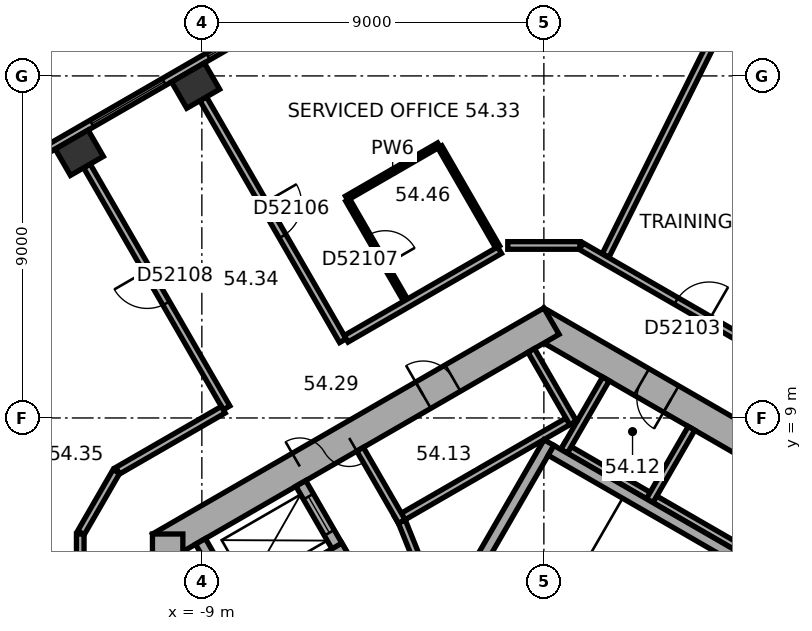
"""IFC4 building model, lengths in metres.
Left out: names, types, materials, properties, quantities, classifications, styles, units other than length and angle.
Written with IfcOpenShell. Run it as: python <this file> out.ifc"""

import sys

from ifc_helpers import new_model, si_unit, direction, frame, frame_2d, origin, origin_2d, place, context, subcontext, project, spatial, rectangle, extrude, element, fill, save


model = new_model("IFC4")
c1 = context("Model", 3, precision=1e-05, world=origin(), true_north=direction((0.0, 1.0)))
c2 = subcontext(c1, "Body", "Model", "MODEL_VIEW")
j1 = project(units=[si_unit("LENGTHUNIT", "METRE"), si_unit("PLANEANGLEUNIT", "RADIAN")], contexts=[c1])
p1 = place(None, origin())
s1 = spatial("IfcSite", under=j1, at=p1, CompositionType="ELEMENT")
p2 = place(p1, origin())
s2 = spatial("IfcBuilding", under=s1, at=p2, CompositionType="ELEMENT")
p3 = place(p2, frame((0.0, 0.0, 221.7)))
s3 = spatial("IfcBuildingStorey", under=s2, at=p3, CompositionType="ELEMENT", Elevation=221.7)
for number, where, z_axis, x_axis in (
    (1, (-9.165, 17.745, 0.0), (0.0, 0.0, 1.0), (-0.866, -0.5, 0.0)),
    (2, (-12.225, 15.978, 0.0), (0.0, 0.0, 1.0), (-0.866, -0.5, 0.0)),
):
    element("IfcColumn", number, at=place(p3, frame(where, z_axis=z_axis, x_axis=x_axis)), inside=s3, PredefinedType="COLUMN", context=c2, shape_type="SweptSolid", body=[
        extrude(rectangle(XDim=1.0, YDim=0.8, at=origin_2d()), origin(), (0.0, 0.0, 1.0), 3.7),
    ])
p4 = place(p3, frame((10.1, 5.6, 0.0), z_axis=(0.0, 0.0, 1.0), x_axis=(-0.866023897231, 0.500002609418, 0.0)))
e3 = element("IfcWall", 3, at=p4, inside=s3, PredefinedType="SHEAR", context=c2, shape_type="SweptSolid", body=[
    extrude(rectangle(XDim=11.894, YDim=0.8, at=frame_2d((5.947, 0.0))), origin(), (0.0, 0.0, 1.0), 3.7),
])
p5 = place(p4, frame((3.897, 0.0, 0.0)))
e4 = element("IfcOpeningElement", 4, at=p5, cuts=e3, PredefinedType="OPENING", context=c2, shape_type="SweptSolid", body=[
    extrude(rectangle(XDim=0.9, YDim=2.1, at=frame_2d((0.45, 1.05))), frame((0.0, 0.41, 0.0), z_axis=(0.0, -1.0, 0.0), x_axis=(1.0, 0.0, 0.0)), (0.0, 0.0, 1.0), 0.82),
])
p6 = place(p4, frame((7.797, 0.0, 0.0)))
e5 = element("IfcOpeningElement", 5, at=p6, cuts=e3, PredefinedType="OPENING", context=c2, shape_type="SweptSolid", body=[
    extrude(rectangle(XDim=0.9, YDim=2.1, at=frame_2d((0.45, 1.05))), frame((0.0, 0.41, 0.0), z_axis=(0.0, -1.0, 0.0), x_axis=(1.0, 0.0, 0.0)), (0.0, 0.0, 1.0), 0.82),
])
p7 = place(p3, frame((0.2, 11.547, 0.0), z_axis=(0.0, 0.0, 1.0), x_axis=(-0.866023897231, -0.500002609418, 0.0)))
e6 = element("IfcWall", 6, at=p7, inside=s3, PredefinedType="SHEAR", context=c2, shape_type="SweptSolid", body=[
    extrude(rectangle(XDim=11.894, YDim=0.8, at=frame_2d((5.947, 0.0))), origin(), (0.0, 0.0, 1.0), 3.7),
])
p8 = place(p7, frame((6.147, 0.0, 0.0)))
e7 = element("IfcOpeningElement", 7, at=p8, cuts=e6, PredefinedType="OPENING", context=c2, shape_type="SweptSolid", body=[
    extrude(rectangle(XDim=1.5, YDim=2.1, at=frame_2d((0.75, 1.05))), frame((0.0, 0.41, 0.0), z_axis=(0.0, -1.0, 0.0), x_axis=(1.0, 0.0, 0.0)), (0.0, 0.0, 1.0), 0.82),
])
p9 = place(p7, frame((2.997, 0.0, 0.0)))
e8 = element("IfcOpeningElement", 8, at=p9, cuts=e6, PredefinedType="OPENING", context=c2, shape_type="SweptSolid", body=[
    extrude(rectangle(XDim=0.9, YDim=2.1, at=frame_2d((0.45, 1.05))), frame((0.0, 0.41, 0.0), z_axis=(0.0, -1.0, 0.0), x_axis=(1.0, 0.0, 0.0)), (0.0, 0.0, 1.0), 0.82),
])
p10 = place(p3, frame((-9.9, 5.947, 0.0), z_axis=(0.0, 0.0, 1.0), x_axis=(0.0, -1.0, 0.0)))
e9 = element("IfcWall", 9, at=p10, inside=s3, PredefinedType="SHEAR", context=c2, shape_type="SweptSolid", body=[
    extrude(rectangle(XDim=11.894, YDim=0.8, at=frame_2d((5.947, 0.0))), origin(), (0.0, 0.0, 1.0), 3.7),
])
p11 = place(p10, frame((5.097, 0.0, 0.0)))
e10 = element("IfcOpeningElement", 10, at=p11, cuts=e9, PredefinedType="OPENING", context=c2, shape_type="SweptSolid", body=[
    extrude(rectangle(XDim=1.1, YDim=2.1, at=frame_2d((0.55, 1.05))), frame((0.0, 0.41, 0.0), z_axis=(0.0, -1.0, 0.0), x_axis=(1.0, 0.0, 0.0)), (0.0, 0.0, 1.0), 0.82),
])
p12 = place(p10, frame((7.697, 0.0, 0.0)))
e11 = element("IfcOpeningElement", 11, at=p12, cuts=e9, PredefinedType="OPENING", context=c2, shape_type="SweptSolid", body=[
    extrude(rectangle(XDim=1.1, YDim=2.1, at=frame_2d((0.55, 1.05))), frame((0.0, 0.41, 0.0), z_axis=(0.0, -1.0, 0.0), x_axis=(1.0, 0.0, 0.0)), (0.0, 0.0, 1.0), 0.82),
])
p13 = place(p3, frame((18.299, 13.727, 0.0), z_axis=(0.0, 0.0, 1.0), x_axis=(-0.894934554817, 0.44619742558, 0.0)))
e12 = element("IfcWall", 12, at=p13, inside=s3, PredefinedType="STANDARD", context=c2, shape_type="SweptSolid", body=[
    extrude(rectangle(XDim=18.841, YDim=0.2, at=frame_2d((9.421, 0.0))), origin(), (0.0, 0.0, 1.0), 3.7),
])
p14 = place(p13, frame((1.253, 0.0, 0.9)))
e13 = element("IfcOpeningElement", 13, at=p14, cuts=e12, PredefinedType="OPENING", context=c2, shape_type="SweptSolid", body=[
    extrude(rectangle(XDim=2.2, YDim=2.0, at=frame_2d((1.1, 1.0))), frame((0.0, 0.11, 0.0), z_axis=(0.0, -1.0, 0.0), x_axis=(1.0, 0.0, 0.0)), (0.0, 0.0, 1.0), 0.22),
])
p15 = place(p13, frame((4.786, 0.0, 0.9)))
e14 = element("IfcOpeningElement", 14, at=p15, cuts=e12, PredefinedType="OPENING", context=c2, shape_type="SweptSolid", body=[
    extrude(rectangle(XDim=2.2, YDim=2.0, at=frame_2d((1.1, 1.0))), frame((0.0, 0.11, 0.0), z_axis=(0.0, -1.0, 0.0), x_axis=(1.0, 0.0, 0.0)), (0.0, 0.0, 1.0), 0.22),
])
p16 = place(p13, frame((8.32, 0.0, 0.9)))
e15 = element("IfcOpeningElement", 15, at=p16, cuts=e12, PredefinedType="OPENING", context=c2, shape_type="SweptSolid", body=[
    extrude(rectangle(XDim=2.2, YDim=2.0, at=frame_2d((1.1, 1.0))), frame((0.0, 0.11, 0.0), z_axis=(0.0, -1.0, 0.0), x_axis=(1.0, 0.0, 0.0)), (0.0, 0.0, 1.0), 0.22),
])
p17 = place(p13, frame((11.854, 0.0, 0.9)))
e16 = element("IfcOpeningElement", 16, at=p17, cuts=e12, PredefinedType="OPENING", context=c2, shape_type="SweptSolid", body=[
    extrude(rectangle(XDim=2.2, YDim=2.0, at=frame_2d((1.1, 1.0))), frame((0.0, 0.11, 0.0), z_axis=(0.0, -1.0, 0.0), x_axis=(1.0, 0.0, 0.0)), (0.0, 0.0, 1.0), 0.22),
])
p18 = place(p13, frame((15.387, 0.0, 0.9)))
e17 = element("IfcOpeningElement", 17, at=p18, cuts=e12, PredefinedType="OPENING", context=c2, shape_type="SweptSolid", body=[
    extrude(rectangle(XDim=2.2, YDim=2.0, at=frame_2d((1.1, 1.0))), frame((0.0, 0.11, 0.0), z_axis=(0.0, -1.0, 0.0), x_axis=(1.0, 0.0, 0.0)), (0.0, 0.0, 1.0), 0.22),
])
p19 = place(p3, frame((-2.786, 22.005, 0.0), z_axis=(0.0, 0.0, 1.0), x_axis=(-0.866026555358, -0.49999800541, 0.0)))
e18 = element("IfcWall", 18, at=p19, inside=s3, PredefinedType="STANDARD", context=c2, shape_type="SweptSolid", body=[
    extrude(rectangle(XDim=18.841, YDim=0.2, at=frame_2d((9.421, 0.0))), origin(), (0.0, 0.0, 1.0), 3.7),
])
p20 = place(p19, frame((1.254, 0.0, 0.9)))
e19 = element("IfcOpeningElement", 19, at=p20, cuts=e18, PredefinedType="OPENING", context=c2, shape_type="SweptSolid", body=[
    extrude(rectangle(XDim=2.2, YDim=2.0, at=frame_2d((1.1, 1.0))), frame((0.0, 0.11, 0.0), z_axis=(0.0, -1.0, 0.0), x_axis=(1.0, 0.0, 0.0)), (0.0, 0.0, 1.0), 0.22),
])
p21 = place(p19, frame((4.788, 0.0, 0.9)))
e20 = element("IfcOpeningElement", 20, at=p21, cuts=e18, PredefinedType="OPENING", context=c2, shape_type="SweptSolid", body=[
    extrude(rectangle(XDim=2.2, YDim=2.0, at=frame_2d((1.1, 1.0))), frame((0.0, 0.11, 0.0), z_axis=(0.0, -1.0, 0.0), x_axis=(1.0, 0.0, 0.0)), (0.0, 0.0, 1.0), 0.22),
])
p22 = place(p19, frame((8.321, 0.0, 0.9)))
e21 = element("IfcOpeningElement", 21, at=p22, cuts=e18, PredefinedType="OPENING", context=c2, shape_type="SweptSolid", body=[
    extrude(rectangle(XDim=2.2, YDim=2.0, at=frame_2d((1.1, 1.0))), frame((0.0, 0.11, 0.0), z_axis=(0.0, -1.0, 0.0), x_axis=(1.0, 0.0, 0.0)), (0.0, 0.0, 1.0), 0.22),
])
p23 = place(p19, frame((11.855, 0.0, 0.9)))
e22 = element("IfcOpeningElement", 22, at=p23, cuts=e18, PredefinedType="OPENING", context=c2, shape_type="SweptSolid", body=[
    extrude(rectangle(XDim=2.2, YDim=2.0, at=frame_2d((1.1, 1.0))), frame((0.0, 0.11, 0.0), z_axis=(0.0, -1.0, 0.0), x_axis=(1.0, 0.0, 0.0)), (0.0, 0.0, 1.0), 0.22),
])
p24 = place(p19, frame((15.389, 0.0, 0.9)))
e23 = element("IfcOpeningElement", 23, at=p24, cuts=e18, PredefinedType="OPENING", context=c2, shape_type="SweptSolid", body=[
    extrude(rectangle(XDim=2.2, YDim=2.0, at=frame_2d((1.1, 1.0))), frame((0.0, 0.11, 0.0), z_axis=(0.0, -1.0, 0.0), x_axis=(1.0, 0.0, 0.0)), (0.0, 0.0, 1.0), 0.22),
])
p25 = place(p3, frame((7.424, 4.259, 0.0), z_axis=(0.0, 0.0, 1.0), x_axis=(-0.866026010844, 0.49999894854, 0.0)))
e24 = element("IfcWall", 24, at=p25, inside=s3, PredefinedType="PARTITIONING", context=c2, shape_type="SweptSolid", body=[
    extrude(rectangle(XDim=8.0, YDim=0.2, at=frame_2d((4.0, 0.0))), origin(), (0.0, 0.0, 1.0), 3.42),
])
for number, where, z_axis, x_axis in (
    (25, (2.784, 6.822, 0.0), (0.0, 0.0, 1.0), (0.5, 0.866, 0.0)),
    (26, (0.532, 8.122, 0.0), (0.0, 0.0, 1.0), (0.5, 0.866, 0.0)),
):
    element("IfcWall", number, at=place(p3, frame(where, z_axis=z_axis, x_axis=x_axis)), inside=s3, PredefinedType="PARTITIONING", context=c2, shape_type="SweptSolid", body=[
        extrude(rectangle(XDim=2.2, YDim=0.2, at=frame_2d((1.1, 0.0))), origin(), (0.0, 0.0, 1.0), 3.42),
    ])
p26 = place(p3, frame((0.803, 9.009, 0.0), z_axis=(0.0, 0.0, 1.0), x_axis=(-0.866028230842, -0.499995103361, 0.0)))
e27 = element("IfcWall", 27, at=p26, inside=s3, PredefinedType="PARTITIONING", context=c2, shape_type="SweptSolid", body=[
    extrude(rectangle(XDim=5.4, YDim=0.2, at=frame_2d((2.7, 0.0))), origin(), (0.0, 0.0, 1.0), 3.42),
])
p27 = place(p3, frame((0.767, 8.872, 0.0), z_axis=(0.0, 0.0, 1.0), x_axis=(-0.499994660107, 0.866028486751, 0.0)))
e28 = element("IfcWall", 28, at=p27, inside=s3, PredefinedType="PARTITIONING", context=c2, shape_type="SweptSolid", body=[
    extrude(rectangle(XDim=2.2, YDim=0.2, at=frame_2d((1.1, 0.0))), origin(), (0.0, 0.0, 1.0), 3.42),
])
p28 = place(p3, frame((-3.737, 6.272, 0.0), z_axis=(0.0, 0.0, 1.0), x_axis=(-0.50002983664, 0.866008176907, 0.0)))
e29 = element("IfcWall", 29, at=p28, inside=s3, PredefinedType="PARTITIONING", context=c2, shape_type="SweptSolid", body=[
    extrude(rectangle(XDim=2.2, YDim=0.2, at=frame_2d((1.1, 0.0))), origin(), (0.0, 0.0, 1.0), 3.42),
])
p29 = place(p3, frame((-2.216, 4.282, 0.0), z_axis=(0.0, 0.0, 1.0), x_axis=(0.499977259774, 0.866038532462, 0.0)))
e30 = element("IfcWall", 30, at=p29, inside=s3, PredefinedType="SHEAR", context=c2, shape_type="SweptSolid", body=[
    extrude(rectangle(XDim=4.7, YDim=0.3, at=frame_2d((2.35, 0.0))), origin(), (0.0, 0.0, 1.0), 3.42),
])
p30 = place(p3, frame((6.303, 4.617, 0.0), z_axis=(0.0, 0.0, 1.0), x_axis=(-0.866027801685, 0.499995846692, 0.0)))
e31 = element("IfcWall", 31, at=p30, inside=s3, PredefinedType="SHEAR", context=c2, shape_type="SweptSolid", body=[
    extrude(rectangle(XDim=7.06, YDim=0.3, at=frame_2d((3.53, 0.0))), origin(), (0.0, 0.0, 1.0), 3.42),
])
p31 = place(p3, frame((-5.295, 5.372, 0.0), z_axis=(0.0, 0.0, 1.0), x_axis=(-0.500077893725, 0.86598042715, 0.0)))
e32 = element("IfcWall", 32, at=p31, inside=s3, PredefinedType="SHEAR", context=c2, shape_type="SweptSolid", body=[
    extrude(rectangle(XDim=2.2, YDim=0.3, at=frame_2d((1.1, 0.0))), origin(), (0.0, 0.0, 1.0), 3.42),
])
p32 = place(p31, frame((0.7, 0.0, 0.0)))
e33 = element("IfcOpeningElement", 33, at=p32, cuts=e32, PredefinedType="OPENING", context=c2, shape_type="SweptSolid", body=[
    extrude(rectangle(XDim=1.1, YDim=2.1, at=frame_2d((0.55, 1.05))), frame((0.0, 0.16, 0.0), z_axis=(0.0, -1.0, 0.0), x_axis=(1.0, 0.0, 0.0)), (0.0, 0.0, 1.0), 0.32),
])
p33 = place(p3, frame((-5.24, 5.577, 0.0), z_axis=(0.0, 0.0, 1.0), x_axis=(-0.866014461049, -0.500018952895, 0.0)))
e34 = element("IfcWall", 34, at=p33, inside=s3, PredefinedType="SHEAR", context=c2, shape_type="SweptSolid", body=[
    extrude(rectangle(XDim=3.35, YDim=0.3, at=frame_2d((1.675, 0.0))), origin(), (0.0, 0.0, 1.0), 3.42),
])
p34 = place(p3, frame((-7.937, 3.847, 0.0), z_axis=(0.0, 0.0, 1.0), x_axis=(-0.50002983664, 0.866008176907, 0.0)))
e35 = element("IfcWall", 35, at=p34, inside=s3, PredefinedType="SHEAR", context=c2, shape_type="SweptSolid", body=[
    extrude(rectangle(XDim=2.2, YDim=0.3, at=frame_2d((1.1, 0.0))), origin(), (0.0, 0.0, 1.0), 3.42),
])
p35 = place(p3, frame((-2.615, 3.487, 0.0), z_axis=(0.0, 0.0, 1.0), x_axis=(-0.373576831041, 0.92759924068, 0.0)))
e36 = element("IfcWall", 36, at=p35, inside=s3, PredefinedType="PARTITIONING", context=c2, shape_type="SweptSolid", body=[
    extrude(rectangle(XDim=3.002, YDim=0.2, at=frame_2d((1.501, 0.0))), origin(), (0.0, 0.0, 1.0), 3.42),
])
p36 = place(p35, frame((1.15, 0.0, 0.0)))
e37 = element("IfcOpeningElement", 37, at=p36, cuts=e36, PredefinedType="OPENING", context=c2, shape_type="SweptSolid", body=[
    extrude(rectangle(XDim=0.9, YDim=2.1, at=frame_2d((0.45, 1.05))), frame((0.0, 0.11, 0.0), z_axis=(0.0, -1.0, 0.0), x_axis=(1.0, 0.0, 0.0)), (0.0, 0.0, 1.0), 0.22),
])
p37 = place(p3, frame((-12.2, 5.947, 0.0), z_axis=(0.0, 0.0, 1.0), x_axis=(0.0, -1.0, 0.0)))
e38 = element("IfcWall", 38, at=p37, inside=s3, PredefinedType="PARTITIONING", context=c2, shape_type="SweptSolid", body=[
    extrude(rectangle(XDim=3.746, YDim=0.2, at=frame_2d((1.873, 0.0))), origin(), (0.0, 0.0, 1.0), 3.42),
])
p38 = place(p3, frame((-12.025, 15.632, 0.0), z_axis=(0.0, 0.0, 1.0), x_axis=(0.499983153418, -0.866035129944, 0.0)))
e39 = element("IfcWall", 39, at=p38, inside=s3, PredefinedType="PARTITIONING", context=c2, shape_type="SweptSolid", body=[
    extrude(rectangle(XDim=7.35, YDim=0.2, at=frame_2d((3.675, 0.0))), origin(), (0.0, 0.0, 1.0), 3.42),
])
p39 = place(p38, frame((3.175, 0.0, 0.0)))
e40 = element("IfcOpeningElement", 40, at=p39, cuts=e39, PredefinedType="OPENING", context=c2, shape_type="SweptSolid", body=[
    extrude(rectangle(XDim=1.0, YDim=2.1, at=frame_2d((0.5, 1.05))), frame((0.0, 0.11, 0.0), z_axis=(0.0, -1.0, 0.0), x_axis=(1.0, 0.0, 0.0)), (0.0, 0.0, 1.0), 0.22),
])
p40 = place(p3, frame((-11.25, 7.592, 0.0), z_axis=(0.0, 0.0, 1.0), x_axis=(-0.499964847546, -0.866045698112, 0.0)))
e41 = element("IfcWall", 41, at=p40, inside=s3, PredefinedType="PARTITIONING", context=c2, shape_type="SweptSolid", body=[
    extrude(rectangle(XDim=1.86, YDim=0.2, at=frame_2d((0.93, 0.0))), origin(), (0.0, 0.0, 1.0), 3.42),
])
p41 = place(p3, frame((-8.965, 17.399, 0.0), z_axis=(0.0, 0.0, 1.0), x_axis=(0.499993683172, -0.866029050776, 0.0)))
e42 = element("IfcWall", 42, at=p41, inside=s3, PredefinedType="PARTITIONING", context=c2, shape_type="SweptSolid", body=[
    extrude(rectangle(XDim=7.35, YDim=0.2, at=frame_2d((3.675, 0.0))), origin(), (0.0, 0.0, 1.0), 2.87),
])
p42 = place(p41, frame((3.175, 0.0, 0.0)))
e43 = element("IfcOpeningElement", 43, at=p42, cuts=e42, PredefinedType="OPENING", context=c2, shape_type="SweptSolid", body=[
    extrude(rectangle(XDim=1.0, YDim=2.1, at=frame_2d((0.5, 1.05))), frame((0.0, 0.11, 0.0), z_axis=(0.0, -1.0, 0.0), x_axis=(1.0, 0.0, 0.0)), (0.0, 0.0, 1.0), 0.22),
])
p43 = place(p3, frame((-8.437, 9.217, 0.0), z_axis=(0.0, 0.0, 1.0), x_axis=(-0.866005660673, -0.500034194513, 0.0)))
e44 = element("IfcWall", 44, at=p43, inside=s3, PredefinedType="PARTITIONING", context=c2, shape_type="SweptSolid", body=[
    extrude(rectangle(XDim=3.209, YDim=0.2, at=frame_2d((1.604, 0.0))), origin(), (0.0, 0.0, 1.0), 3.42),
])
p44 = place(p3, frame((-5.191, 14.785, 0.0), z_axis=(0.0, 0.0, 1.0), x_axis=(0.866034573852, 0.49998411664, 0.0)))
e45 = element("IfcWall", 45, at=p44, inside=s3, PredefinedType="PARTITIONING", context=c2, shape_type="SweptSolid", body=[
    extrude(rectangle(XDim=2.8, YDim=0.12, at=frame_2d((1.4, 0.0))), origin(), (0.0, 0.0, 1.0), 3.42),
])
p45 = place(p3, frame((-3.641, 12.101, 0.0), z_axis=(0.0, 0.0, 1.0), x_axis=(-0.500026023896, 0.86601037836, 0.0)))
e46 = element("IfcWall", 46, at=p45, inside=s3, PredefinedType="PARTITIONING", context=c2, shape_type="SweptSolid", body=[
    extrude(rectangle(XDim=3.04, YDim=0.12, at=frame_2d((1.52, 0.0))), origin(), (0.0, 0.0, 1.0), 3.42),
])
p46 = place(p45, frame((1.07, 0.0, 0.0)))
e47 = element("IfcOpeningElement", 47, at=p46, cuts=e46, PredefinedType="OPENING", context=c2, shape_type="SweptSolid", body=[
    extrude(rectangle(XDim=0.9, YDim=2.1, at=frame_2d((0.45, 1.05))), frame((0.0, 0.07, 0.0), z_axis=(0.0, -1.0, 0.0), x_axis=(1.0, 0.0, 0.0)), (0.0, 0.0, 1.0), 0.14),
])
p47 = place(p3, frame((-2.737, 16.133, 0.0), z_axis=(0.0, 0.0, 1.0), x_axis=(0.500026023896, -0.86601037836, 0.0)))
e48 = element("IfcWall", 48, at=p47, inside=s3, PredefinedType="PARTITIONING", context=c2, shape_type="SweptSolid", body=[
    extrude(rectangle(XDim=3.04, YDim=0.12, at=frame_2d((1.52, 0.0))), origin(), (0.0, 0.0, 1.0), 3.42),
])
p48 = place(p3, frame((-1.167, 13.414, 0.0), z_axis=(0.0, 0.0, 1.0), x_axis=(-0.866023347809, -0.500003561037, 0.0)))
e49 = element("IfcWall", 49, at=p48, inside=s3, PredefinedType="PARTITIONING", context=c2, shape_type="SweptSolid", body=[
    extrude(rectangle(XDim=4.661, YDim=0.2, at=frame_2d((2.331, 0.0))), origin(), (0.0, 0.0, 1.0), 3.42),
])
p49 = place(p3, frame((0.95, 13.539, 0.0), z_axis=(0.0, 0.0, 1.0), x_axis=(-1.0, 0.0, 0.0)))
e50 = element("IfcWall", 50, at=p49, inside=s3, PredefinedType="PARTITIONING", context=c2, shape_type="SweptSolid", body=[
    extrude(rectangle(XDim=1.9, YDim=0.2, at=frame_2d((0.95, 0.0))), origin(), (0.0, 0.0, 1.0), 3.42),
])
p50 = place(p3, frame((4.723, 19.49, 0.0), z_axis=(0.0, 0.0, 1.0), x_axis=(-0.446186614574, -0.894939944898, 0.0)))
e51 = element("IfcWall", 51, at=p50, inside=s3, PredefinedType="PARTITIONING", context=c2, shape_type="SweptSolid", body=[
    extrude(rectangle(XDim=6.944, YDim=0.2, at=frame_2d((3.472, 0.0))), origin(), (0.0, 0.0, 1.0), 2.87),
])
p51 = place(p3, frame((8.721, 9.052, 0.0), z_axis=(0.0, 0.0, 1.0), x_axis=(-0.866028125821, 0.499995285264, 0.0)))
e52 = element("IfcWall", 52, at=p51, inside=s3, PredefinedType="PARTITIONING", context=c2, shape_type="SweptSolid", body=[
    extrude(rectangle(XDim=8.934, YDim=0.2, at=frame_2d((4.467, 0.0))), origin(), (0.0, 0.0, 1.0), 3.42),
])
p52 = place(p51, frame((5.05, 0.0, 0.0)))
e53 = element("IfcOpeningElement", 53, at=p52, cuts=e52, PredefinedType="OPENING", context=c2, shape_type="SweptSolid", body=[
    extrude(rectangle(XDim=1.0, YDim=2.1, at=frame_2d((0.5, 1.05))), frame((0.0, 0.11, 0.0), z_axis=(0.0, -1.0, 0.0), x_axis=(1.0, 0.0, 0.0)), (0.0, 0.0, 1.0), 0.22),
])
p53 = place(p21, origin())
e54 = element("IfcWindow", 54, at=p53, inside=s3, PartitioningType="SINGLE_PANEL", PredefinedType="WINDOW", context=c2, shape_type="SweptSolid", body=[
    extrude(rectangle(XDim=2.2, YDim=2.0, at=frame_2d((1.1, 1.0))), frame((0.0, 0.03, 0.0), z_axis=(0.0, -1.0, 0.0), x_axis=(1.0, 0.0, 0.0)), (0.0, 0.0, 1.0), 0.06),
])
fill(e20, e54)
p54 = place(p22, origin())
e55 = element("IfcWindow", 55, at=p54, inside=s3, PartitioningType="SINGLE_PANEL", PredefinedType="WINDOW", context=c2, shape_type="SweptSolid", body=[
    extrude(rectangle(XDim=2.2, YDim=2.0, at=frame_2d((1.1, 1.0))), frame((0.0, 0.03, 0.0), z_axis=(0.0, -1.0, 0.0), x_axis=(1.0, 0.0, 0.0)), (0.0, 0.0, 1.0), 0.06),
])
fill(e21, e55)
p55 = place(p8, origin())
e56 = element("IfcDoor", 56, at=p55, inside=s3, OperationType="DOUBLE_DOOR_SINGLE_SWING", PredefinedType="DOOR", context=c2, shape_type="SweptSolid", body=[
    extrude(rectangle(XDim=1.5, YDim=2.1, at=frame_2d((0.75, 1.05))), frame((0.0, 0.025, 0.0), z_axis=(0.0, -1.0, 0.0), x_axis=(1.0, 0.0, 0.0)), (0.0, 0.0, 1.0), 0.05),
])
fill(e7, e56)
p56 = place(p6, origin())
e57 = element("IfcDoor", 57, at=p56, inside=s3, OperationType="SINGLE_SWING_LEFT", PredefinedType="DOOR", context=c2, shape_type="SweptSolid", body=[
    extrude(rectangle(XDim=0.9, YDim=2.1, at=frame_2d((0.45, 1.05))), frame((0.0, 0.025, 0.0), z_axis=(0.0, -1.0, 0.0), x_axis=(1.0, 0.0, 0.0)), (0.0, 0.0, 1.0), 0.05),
])
fill(e5, e57)
p57 = place(p9, origin())
e58 = element("IfcDoor", 58, at=p57, inside=s3, OperationType="SINGLE_SWING_LEFT", PredefinedType="DOOR", context=c2, shape_type="SweptSolid", body=[
    extrude(rectangle(XDim=0.9, YDim=2.1, at=frame_2d((0.45, 1.05))), frame((0.0, 0.025, 0.0), z_axis=(0.0, -1.0, 0.0), x_axis=(1.0, 0.0, 0.0)), (0.0, 0.0, 1.0), 0.05),
])
fill(e8, e58)
p58 = place(p32, origin())
e59 = element("IfcDoor", 59, at=p58, inside=s3, OperationType="DOUBLE_DOOR_SLIDING", PredefinedType="DOOR", context=c2, shape_type="SweptSolid", body=[
    extrude(rectangle(XDim=1.1, YDim=2.1, at=frame_2d((0.55, 1.05))), frame((0.0, 0.025, 0.0), z_axis=(0.0, -1.0, 0.0), x_axis=(1.0, 0.0, 0.0)), (0.0, 0.0, 1.0), 0.05),
])
fill(e33, e59)
p59 = place(p52, origin())
e60 = element("IfcDoor", 60, at=p59, inside=s3, OperationType="SINGLE_SWING_LEFT", PredefinedType="DOOR", context=c2, shape_type="SweptSolid", body=[
    extrude(rectangle(XDim=1.0, YDim=2.1, at=frame_2d((0.5, 1.05))), frame((0.0, 0.025, 0.0), z_axis=(0.0, -1.0, 0.0), x_axis=(1.0, 0.0, 0.0)), (0.0, 0.0, 1.0), 0.05),
])
fill(e53, e60)
p60 = place(p42, origin())
e61 = element("IfcDoor", 61, at=p60, inside=s3, OperationType="SINGLE_SWING_LEFT", PredefinedType="DOOR", context=c2, shape_type="SweptSolid", body=[
    extrude(rectangle(XDim=1.0, YDim=2.1, at=frame_2d((0.5, 1.05))), frame((0.0, 0.025, 0.0), z_axis=(0.0, -1.0, 0.0), x_axis=(1.0, 0.0, 0.0)), (0.0, 0.0, 1.0), 0.05),
])
fill(e43, e61)
p61 = place(p46, origin())
e62 = element("IfcDoor", 62, at=p61, inside=s3, OperationType="SINGLE_SWING_LEFT", PredefinedType="DOOR", context=c2, shape_type="SweptSolid", body=[
    extrude(rectangle(XDim=0.9, YDim=2.1, at=frame_2d((0.45, 1.05))), frame((0.0, 0.025, 0.0), z_axis=(0.0, -1.0, 0.0), x_axis=(1.0, 0.0, 0.0)), (0.0, 0.0, 1.0), 0.05),
])
fill(e47, e62)
p62 = place(p39, origin())
e63 = element("IfcDoor", 63, at=p62, inside=s3, OperationType="SINGLE_SWING_LEFT", PredefinedType="DOOR", context=c2, shape_type="SweptSolid", body=[
    extrude(rectangle(XDim=1.0, YDim=2.1, at=frame_2d((0.5, 1.05))), frame((0.0, 0.025, 0.0), z_axis=(0.0, -1.0, 0.0), x_axis=(1.0, 0.0, 0.0)), (0.0, 0.0, 1.0), 0.05),
])
fill(e40, e63)
save(model, sys.argv[1])
